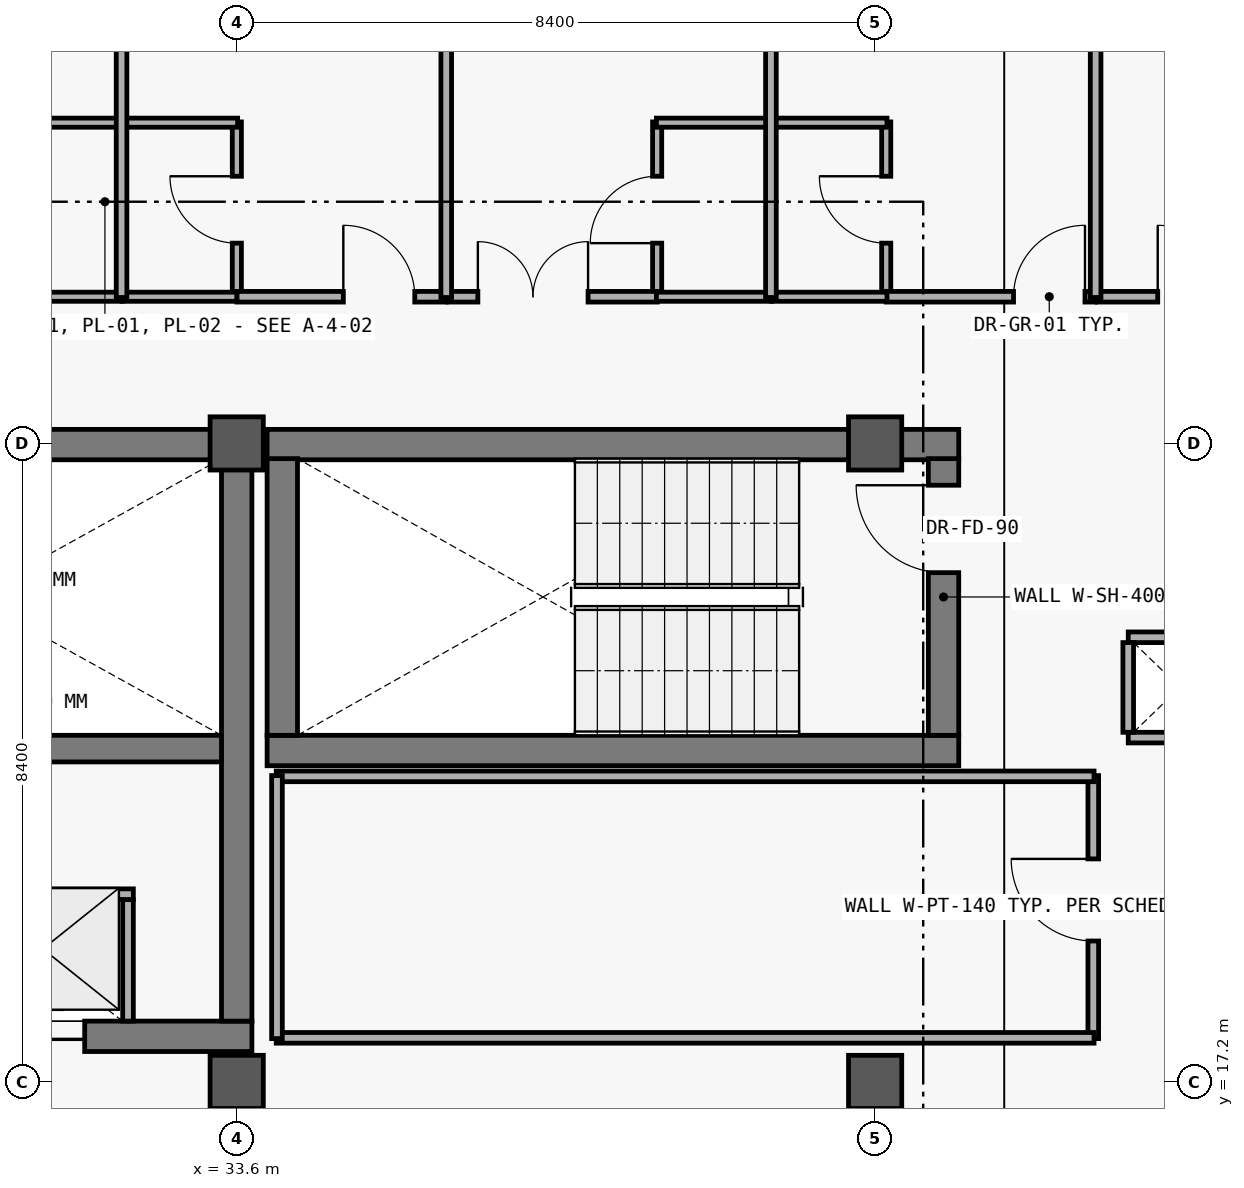
"""IFC4 building model, lengths in metres.
Left out: names, types, materials, properties, quantities, classifications, styles, units other than length and angle.
Written with IfcOpenShell. Run it as: python <this file> out.ifc"""

import sys

from ifc_helpers import new_model, si_unit, direction, frame, frame_2d, origin, origin_2d, place, context, subcontext, project, spatial, rectangle, extrude, element, fill, save


model = new_model("IFC4")
c1 = context("Model", 3, precision=1e-05, world=origin(), true_north=direction((0.0, 1.0)))
c2 = subcontext(c1, "Body", "Model", "MODEL_VIEW")
j1 = project(units=[si_unit("LENGTHUNIT", "METRE"), si_unit("PLANEANGLEUNIT", "RADIAN")], contexts=[c1])
p1 = place(None, origin())
s1 = spatial("IfcSite", under=j1, at=p1, CompositionType="ELEMENT")
p2 = place(p1, origin())
s2 = spatial("IfcBuilding", under=s1, at=p2, CompositionType="ELEMENT")
p3 = place(p2, frame((0.0, 0.0, 19.2)))
s3 = spatial("IfcBuildingStorey", under=s2, at=p3, CompositionType="ELEMENT", Elevation=19.2)
for number, where, z_axis, x_axis in (
    (1, (33.6, 17.2, 0.0), (0.0, 0.0, 1.0), (1.0, 0.0, 0.0)),
    (2, (33.6, 25.6, 0.0), (0.0, 0.0, 1.0), (1.0, 0.0, 0.0)),
    (3, (42.0, 17.2, 0.0), (0.0, 0.0, 1.0), (1.0, 0.0, 0.0)),
    (4, (42.0, 25.6, 0.0), (0.0, 0.0, 1.0), (1.0, 0.0, 0.0)),
):
    element("IfcColumn", number, at=place(p3, frame(where, z_axis=z_axis, x_axis=x_axis)), inside=s3, PredefinedType="COLUMN", context=c2, shape_type="SweptSolid", body=[
        extrude(rectangle(XDim=0.7, YDim=0.7, at=origin_2d()), origin(), (0.0, 0.0, 1.0), 3.6),
    ])
p4 = place(p3, frame((24.6, 17.8, 0.0), z_axis=(0.0, 0.0, 1.0), x_axis=(1.0, 0.0, 0.0)))
e5 = element("IfcWall", 5, at=p4, inside=s3, PredefinedType="SHEAR", context=c2, shape_type="SweptSolid", body=[
    extrude(rectangle(XDim=9.2, YDim=0.4, at=frame_2d((4.6, 0.0))), origin(), (0.0, 0.0, 1.0), 3.32),
])
p5 = place(p4, frame((1.1, 0.0, 0.0)))
e6 = element("IfcOpeningElement", 6, at=p5, cuts=e5, PredefinedType="OPENING", context=c2, shape_type="SweptSolid", body=[
    extrude(rectangle(XDim=1.2, YDim=2.2, at=frame_2d((0.6, 1.1))), frame((0.0, 0.21, 0.0), z_axis=(0.0, -1.0, 0.0), x_axis=(1.0, 0.0, 0.0)), (0.0, 0.0, 1.0), 0.42),
])
p6 = place(p4, frame((3.5, 0.0, 0.0)))
e7 = element("IfcOpeningElement", 7, at=p6, cuts=e5, PredefinedType="OPENING", context=c2, shape_type="SweptSolid", body=[
    extrude(rectangle(XDim=1.1, YDim=2.2, at=frame_2d((0.55, 1.1))), frame((0.0, 0.21, 0.0), z_axis=(0.0, -1.0, 0.0), x_axis=(1.0, 0.0, 0.0)), (0.0, 0.0, 1.0), 0.42),
])
p7 = place(p4, frame((5.9, 0.0, 0.0)))
e8 = element("IfcOpeningElement", 8, at=p7, cuts=e5, PredefinedType="OPENING", context=c2, shape_type="SweptSolid", body=[
    extrude(rectangle(XDim=1.1, YDim=2.2, at=frame_2d((0.55, 1.1))), frame((0.0, 0.21, 0.0), z_axis=(0.0, -1.0, 0.0), x_axis=(1.0, 0.0, 0.0)), (0.0, 0.0, 1.0), 0.42),
])
p8 = place(p3, frame((33.8, 25.585, 0.0), z_axis=(0.0, 0.0, 1.0), x_axis=(-1.0, 0.0, 0.0)))
e9 = element("IfcWall", 9, at=p8, inside=s3, PredefinedType="SHEAR", context=c2, shape_type="SweptSolid", body=[
    extrude(rectangle(XDim=9.2, YDim=0.4, at=frame_2d((4.6, 0.0))), origin(), (0.0, 0.0, 1.0), 3.32),
])
p9 = place(p3, frame((33.6, 18.0, 0.0), z_axis=(0.0, 0.0, 1.0), x_axis=(0.0, 1.0, 0.0)))
e10 = element("IfcWall", 10, at=p9, inside=s3, PredefinedType="SHEAR", context=c2, shape_type="SweptSolid", body=[
    extrude(rectangle(XDim=7.4, YDim=0.4, at=frame_2d((3.7, 0.0))), origin(), (0.0, 0.0, 1.0), 3.32),
])
p10 = place(p3, frame((25.0, 21.585, 0.0), z_axis=(0.0, 0.0, 1.0), x_axis=(1.0, 0.0, 0.0)))
e11 = element("IfcWall", 11, at=p10, inside=s3, PredefinedType="SHEAR", context=c2, shape_type="SweptSolid", body=[
    extrude(rectangle(XDim=8.4, YDim=0.35, at=frame_2d((4.2, 0.0))), origin(), (0.0, 0.0, 1.0), 3.32),
])
p11 = place(p3, frame((32.17, 18.0, 0.0), z_axis=(0.0, 0.0, 1.0), x_axis=(0.0, 1.0, 0.0)))
e12 = element("IfcWall", 12, at=p11, inside=s3, PredefinedType="PARTITIONING", context=c2, shape_type="SweptSolid", body=[
    extrude(rectangle(XDim=1.6, YDim=0.14, at=frame_2d((0.8, 0.0))), origin(), (0.0, 0.0, 1.0), 2.47),
])
p12 = place(p3, frame((25.06, 19.67, 0.0), z_axis=(0.0, 0.0, 1.0), x_axis=(1.0, 0.0, 0.0)))
e13 = element("IfcWall", 13, at=p12, inside=s3, PredefinedType="PARTITIONING", context=c2, shape_type="SweptSolid", body=[
    extrude(rectangle(XDim=7.18, YDim=0.14, at=frame_2d((3.59, 0.0))), origin(), (0.0, 0.0, 1.0), 2.47),
])
for number, where, z_axis, x_axis in (
    (14, (34.0, 21.56, 0.0), (0.0, 0.0, 1.0), (1.0, 0.0, 0.0)),
    (15, (43.1, 25.585, 0.0), (0.0, 0.0, 1.0), (-1.0, 0.0, 0.0)),
):
    element("IfcWall", number, at=place(p3, frame(where, z_axis=z_axis, x_axis=x_axis)), inside=s3, PredefinedType="SHEAR", context=c2, shape_type="SweptSolid", body=[
        extrude(rectangle(XDim=9.1, YDim=0.4, at=frame_2d((4.55, 0.0))), origin(), (0.0, 0.0, 1.0), 3.32),
    ])
p13 = place(p3, frame((34.2, 25.4, 0.0), z_axis=(0.0, 0.0, 1.0), x_axis=(0.0, -1.0, 0.0)))
e16 = element("IfcWall", 16, at=p13, inside=s3, PredefinedType="SHEAR", context=c2, shape_type="SweptSolid", body=[
    extrude(rectangle(XDim=3.64, YDim=0.4, at=frame_2d((1.82, 0.0))), origin(), (0.0, 0.0, 1.0), 3.32),
])
p14 = place(p3, frame((42.9, 21.76, 0.0), z_axis=(0.0, 0.0, 1.0), x_axis=(0.0, 1.0, 0.0)))
e17 = element("IfcWall", 17, at=p14, inside=s3, PredefinedType="SHEAR", context=c2, shape_type="SweptSolid", body=[
    extrude(rectangle(XDim=3.64, YDim=0.4, at=frame_2d((1.82, 0.0))), origin(), (0.0, 0.0, 1.0), 3.32),
])
p15 = place(p14, frame((2.14, 0.0, 0.0)))
e18 = element("IfcOpeningElement", 18, at=p15, cuts=e17, PredefinedType="OPENING", context=c2, shape_type="SweptSolid", body=[
    extrude(rectangle(XDim=1.15, YDim=2.2, at=frame_2d((0.575, 1.1))), frame((0.0, 0.21, 0.0), z_axis=(0.0, -1.0, 0.0), x_axis=(1.0, 0.0, 0.0)), (0.0, 0.0, 1.0), 0.42),
])
p16 = place(p3, frame((33.602, 27.52, 0.0), z_axis=(0.0, 0.0, 1.0), x_axis=(0.0, 1.0, 0.0)))
e19 = element("IfcWall", 19, at=p16, inside=s3, PredefinedType="PARTITIONING", context=c2, shape_type="SweptSolid", body=[
    extrude(rectangle(XDim=2.31, YDim=0.12, at=frame_2d((1.155, 0.0))), origin(), (0.0, 0.0, 1.0), 2.48),
])
p17 = place(p16, frame((0.715, 0.0, 0.0)))
e20 = element("IfcOpeningElement", 20, at=p17, cuts=e19, PredefinedType="OPENING", context=c2, shape_type="SweptSolid", body=[
    extrude(rectangle(XDim=0.88, YDim=2.15, at=frame_2d((0.44, 1.075))), frame((0.0, 0.07, 0.0), z_axis=(0.0, -1.0, 0.0), x_axis=(1.0, 0.0, 0.0)), (0.0, 0.0, 1.0), 0.14),
])
p18 = place(p3, frame((39.132, 27.52, 0.0), z_axis=(0.0, 0.0, 1.0), x_axis=(0.0, 1.0, 0.0)))
e21 = element("IfcWall", 21, at=p18, inside=s3, PredefinedType="PARTITIONING", context=c2, shape_type="SweptSolid", body=[
    extrude(rectangle(XDim=2.31, YDim=0.12, at=frame_2d((1.155, 0.0))), origin(), (0.0, 0.0, 1.0), 2.48),
])
p19 = place(p18, frame((0.715, 0.0, 0.0)))
e22 = element("IfcOpeningElement", 22, at=p19, cuts=e21, PredefinedType="OPENING", context=c2, shape_type="SweptSolid", body=[
    extrude(rectangle(XDim=0.88, YDim=2.15, at=frame_2d((0.44, 1.075))), frame((0.0, 0.07, 0.0), z_axis=(0.0, -1.0, 0.0), x_axis=(1.0, 0.0, 0.0)), (0.0, 0.0, 1.0), 0.14),
])
p20 = place(p3, frame((42.146, 27.52, 0.0), z_axis=(0.0, 0.0, 1.0), x_axis=(0.0, 1.0, 0.0)))
e23 = element("IfcWall", 23, at=p20, inside=s3, PredefinedType="PARTITIONING", context=c2, shape_type="SweptSolid", body=[
    extrude(rectangle(XDim=2.31, YDim=0.12, at=frame_2d((1.155, 0.0))), origin(), (0.0, 0.0, 1.0), 2.48),
])
p21 = place(p20, frame((0.715, 0.0, 0.0)))
e24 = element("IfcOpeningElement", 24, at=p21, cuts=e23, PredefinedType="OPENING", context=c2, shape_type="SweptSolid", body=[
    extrude(rectangle(XDim=0.88, YDim=2.15, at=frame_2d((0.44, 1.075))), frame((0.0, 0.07, 0.0), z_axis=(0.0, -1.0, 0.0), x_axis=(1.0, 0.0, 0.0)), (0.0, 0.0, 1.0), 0.14),
])
p22 = place(p3, frame((44.87, 17.77, 0.0), z_axis=(0.0, 0.0, 1.0), x_axis=(0.0, 1.0, 0.0)))
e25 = element("IfcWall", 25, at=p22, inside=s3, PredefinedType="PARTITIONING", context=c2, shape_type="SweptSolid", body=[
    extrude(rectangle(XDim=3.46, YDim=0.14, at=frame_2d((1.73, 0.0))), origin(), (0.0, 0.0, 1.0), 2.48),
])
p23 = place(p22, frame((1.284, 0.0, 0.0)))
e26 = element("IfcOpeningElement", 26, at=p23, cuts=e25, PredefinedType="OPENING", context=c2, shape_type="SweptSolid", body=[
    extrude(rectangle(XDim=1.08, YDim=2.25, at=frame_2d((0.54, 1.125))), frame((0.0, 0.08, 0.0), z_axis=(0.0, -1.0, 0.0), x_axis=(1.0, 0.0, 0.0)), (0.0, 0.0, 1.0), 0.16),
])
p24 = place(p3, frame((33.602, 27.53, 0.0), z_axis=(0.0, 0.0, 1.0), x_axis=(1.0, 0.0, 0.0)))
e27 = element("IfcWall", 27, at=p24, inside=s3, PredefinedType="PARTITIONING", context=c2, shape_type="SweptSolid", body=[
    extrude(rectangle(XDim=2.755, YDim=0.14, at=frame_2d((1.377, 0.0))), origin(), (0.0, 0.0, 1.0), 2.48),
])
p25 = place(p24, frame((1.401, 0.0, 0.0)))
e28 = element("IfcOpeningElement", 28, at=p25, cuts=e27, PredefinedType="OPENING", context=c2, shape_type="SweptSolid", body=[
    extrude(rectangle(XDim=0.94, YDim=2.2, at=frame_2d((0.47, 1.1))), frame((0.0, 0.08, 0.0), z_axis=(0.0, -1.0, 0.0), x_axis=(1.0, 0.0, 0.0)), (0.0, 0.0, 1.0), 0.16),
])
p26 = place(p3, frame((36.377, 27.53, 0.0), z_axis=(0.0, 0.0, 1.0), x_axis=(1.0, 0.0, 0.0)))
e29 = element("IfcWall", 29, at=p26, inside=s3, PredefinedType="PARTITIONING", context=c2, shape_type="SweptSolid", body=[
    extrude(rectangle(XDim=2.755, YDim=0.14, at=frame_2d((1.377, 0.0))), origin(), (0.0, 0.0, 1.0), 2.48),
])
p27 = place(p26, frame((0.396, 0.0, 0.0)))
e30 = element("IfcOpeningElement", 30, at=p27, cuts=e29, PredefinedType="OPENING", context=c2, shape_type="SweptSolid", body=[
    extrude(rectangle(XDim=1.45, YDim=2.3, at=frame_2d((0.725, 1.15))), frame((0.0, 0.08, 0.0), z_axis=(0.0, -1.0, 0.0), x_axis=(1.0, 0.0, 0.0)), (0.0, 0.0, 1.0), 0.16),
])
p28 = place(p3, frame((42.146, 27.53, 0.0), z_axis=(0.0, 0.0, 1.0), x_axis=(1.0, 0.0, 0.0)))
e31 = element("IfcWall", 31, at=p28, inside=s3, PredefinedType="PARTITIONING", context=c2, shape_type="SweptSolid", body=[
    extrude(rectangle(XDim=2.755, YDim=0.14, at=frame_2d((1.377, 0.0))), origin(), (0.0, 0.0, 1.0), 2.48),
])
p29 = place(p28, frame((1.675, 0.0, 0.0)))
e32 = element("IfcOpeningElement", 32, at=p29, cuts=e31, PredefinedType="OPENING", context=c2, shape_type="SweptSolid", body=[
    extrude(rectangle(XDim=0.94, YDim=2.2, at=frame_2d((0.47, 1.1))), frame((0.0, 0.08, 0.0), z_axis=(0.0, -1.0, 0.0), x_axis=(1.0, 0.0, 0.0)), (0.0, 0.0, 1.0), 0.16),
])
p30 = place(p3, frame((44.921, 27.53, 0.0), z_axis=(0.0, 0.0, 1.0), x_axis=(1.0, 0.0, 0.0)))
e33 = element("IfcWall", 33, at=p30, inside=s3, PredefinedType="PARTITIONING", context=c2, shape_type="SweptSolid", body=[
    extrude(rectangle(XDim=2.754, YDim=0.14, at=frame_2d((1.377, 0.0))), origin(), (0.0, 0.0, 1.0), 2.48),
])
p31 = place(p30, frame((0.797, 0.0, 0.0)))
e34 = element("IfcOpeningElement", 34, at=p31, cuts=e33, PredefinedType="OPENING", context=c2, shape_type="SweptSolid", body=[
    extrude(rectangle(XDim=0.94, YDim=2.2, at=frame_2d((0.47, 1.1))), frame((0.0, 0.08, 0.0), z_axis=(0.0, -1.0, 0.0), x_axis=(1.0, 0.0, 0.0)), (0.0, 0.0, 1.0), 0.16),
])
for number, where, z_axis, x_axis in (
    (35, (30.578, 27.53, 0.0), (0.0, 0.0, 1.0), (1.0, 0.0, 0.0)),
    (36, (30.578, 29.82, 0.0), (0.0, 0.0, 1.0), (1.0, 0.0, 0.0)),
):
    element("IfcWall", number, at=place(p3, frame(where, z_axis=z_axis, x_axis=x_axis)), inside=s3, PredefinedType="PARTITIONING", context=c2, shape_type="SweptSolid", body=[
        extrude(rectangle(XDim=1.517, YDim=0.12, at=frame_2d((0.759, 0.0))), origin(), (0.0, 0.0, 1.0), 2.48),
    ])
p32 = place(p3, frame((32.095, 27.53, 0.0), z_axis=(0.0, 0.0, 1.0), x_axis=(1.0, 0.0, 0.0)))
e37 = element("IfcWall", 37, at=p32, inside=s3, PredefinedType="PARTITIONING", context=c2, shape_type="SweptSolid", body=[
    extrude(rectangle(XDim=1.507, YDim=0.12, at=frame_2d((0.753, 0.0))), origin(), (0.0, 0.0, 1.0), 2.48),
])
p33 = place(p3, frame((32.095, 29.82, 0.0), z_axis=(0.0, 0.0, 1.0), x_axis=(1.0, 0.0, 0.0)))
e38 = element("IfcWall", 38, at=p33, inside=s3, PredefinedType="PARTITIONING", context=c2, shape_type="SweptSolid", body=[
    extrude(rectangle(XDim=1.517, YDim=0.12, at=frame_2d((0.759, 0.0))), origin(), (0.0, 0.0, 1.0), 2.48),
])
for number, where, z_axis, x_axis in (
    (39, (39.122, 27.53, 0.0), (0.0, 0.0, 1.0), (1.0, 0.0, 0.0)),
    (40, (39.122, 29.82, 0.0), (0.0, 0.0, 1.0), (1.0, 0.0, 0.0)),
):
    element("IfcWall", number, at=place(p3, frame(where, z_axis=z_axis, x_axis=x_axis)), inside=s3, PredefinedType="PARTITIONING", context=c2, shape_type="SweptSolid", body=[
        extrude(rectangle(XDim=1.517, YDim=0.12, at=frame_2d((0.758, 0.0))), origin(), (0.0, 0.0, 1.0), 2.48),
    ])
for number, where, z_axis, x_axis in (
    (41, (40.639, 27.53, 0.0), (0.0, 0.0, 1.0), (1.0, 0.0, 0.0)),
    (42, (40.639, 29.82, 0.0), (0.0, 0.0, 1.0), (1.0, 0.0, 0.0)),
):
    element("IfcWall", number, at=place(p3, frame(where, z_axis=z_axis, x_axis=x_axis)), inside=s3, PredefinedType="PARTITIONING", context=c2, shape_type="SweptSolid", body=[
        extrude(rectangle(XDim=1.517, YDim=0.12, at=frame_2d((0.759, 0.0))), origin(), (0.0, 0.0, 1.0), 2.48),
    ])
for number, where, z_axis, x_axis in (
    (43, (34.12, 17.78, 0.0), (0.0, 0.0, 1.0), (1.0, 0.0, 0.0)),
    (44, (34.12, 21.22, 0.0), (0.0, 0.0, 1.0), (1.0, 0.0, 0.0)),
):
    element("IfcWall", number, at=place(p3, frame(where, z_axis=z_axis, x_axis=x_axis)), inside=s3, PredefinedType="PARTITIONING", context=c2, shape_type="SweptSolid", body=[
        extrude(rectangle(XDim=10.76, YDim=0.14, at=frame_2d((5.38, 0.0))), origin(), (0.0, 0.0, 1.0), 2.48),
    ])
p34 = place(p3, frame((34.13, 17.77, 0.0), z_axis=(0.0, 0.0, 1.0), x_axis=(0.0, 1.0, 0.0)))
e45 = element("IfcWall", 45, at=p34, inside=s3, PredefinedType="PARTITIONING", context=c2, shape_type="SweptSolid", body=[
    extrude(rectangle(XDim=3.46, YDim=0.14, at=frame_2d((1.73, 0.0))), origin(), (0.0, 0.0, 1.0), 2.48),
])
for number, where, z_axis, x_axis in (
    (46, (32.085, 27.52, 0.0), (0.0, 0.0, 1.0), (0.0, 1.0, 0.0)),
    (47, (36.357, 27.52, 0.0), (0.0, 0.0, 1.0), (0.0, 1.0, 0.0)),
    (48, (40.629, 27.52, 0.0), (0.0, 0.0, 1.0), (0.0, 1.0, 0.0)),
    (49, (44.901, 27.52, 0.0), (0.0, 0.0, 1.0), (0.0, 1.0, 0.0)),
):
    element("IfcWall", number, at=place(p3, frame(where, z_axis=z_axis, x_axis=x_axis)), inside=s3, PredefinedType="PARTITIONING", context=c2, shape_type="SweptSolid", body=[
        extrude(rectangle(XDim=6.2, YDim=0.14, at=frame_2d((3.1, 0.0))), origin(), (0.0, 0.0, 1.0), 2.48),
    ])
for number, where, z_axis, x_axis in (
    (50, (45.33, 21.73, 0.0), (0.0, 0.0, 1.0), (1.0, 0.0, 0.0)),
    (51, (46.69, 23.05, 0.0), (0.0, 0.0, 1.0), (-1.0, 0.0, 0.0)),
):
    element("IfcWall", number, at=place(p3, frame(where, z_axis=z_axis, x_axis=x_axis)), inside=s3, PredefinedType="PARTITIONING", context=c2, shape_type="SweptSolid", body=[
        extrude(rectangle(XDim=1.36, YDim=0.14, at=frame_2d((0.68, 0.0))), origin(), (0.0, 0.0, 1.0), 2.44),
    ])
p35 = place(p3, frame((45.33, 22.98, 0.0), z_axis=(0.0, 0.0, 1.0), x_axis=(0.0, -1.0, 0.0)))
e52 = element("IfcWall", 52, at=p35, inside=s3, PredefinedType="PARTITIONING", context=c2, shape_type="SweptSolid", body=[
    extrude(rectangle(XDim=1.18, YDim=0.14, at=frame_2d((0.59, 0.0))), origin(), (0.0, 0.0, 1.0), 2.44),
])
p36 = place(p7, origin())
e53 = element("IfcDoor", 53, at=p36, inside=s3, OperationType="DOUBLE_DOOR_SLIDING", PredefinedType="DOOR", context=c2, shape_type="SweptSolid", body=[
    extrude(rectangle(XDim=1.1, YDim=2.2, at=frame_2d((0.55, 1.1))), frame((0.0, 0.025, 0.0), z_axis=(0.0, -1.0, 0.0), x_axis=(1.0, 0.0, 0.0)), (0.0, 0.0, 1.0), 0.05),
])
fill(e8, e53)
p37 = place(p15, origin())
e54 = element("IfcDoor", 54, at=p37, inside=s3, OperationType="SINGLE_SWING_RIGHT", PredefinedType="DOOR", context=c2, shape_type="SweptSolid", body=[
    extrude(rectangle(XDim=1.15, YDim=2.2, at=frame_2d((0.575, 1.1))), frame((0.0, 0.025, 0.0), z_axis=(0.0, -1.0, 0.0), x_axis=(1.0, 0.0, 0.0)), (0.0, 0.0, 1.0), 0.05),
])
fill(e18, e54)
p38 = place(p17, origin())
e55 = element("IfcDoor", 55, at=p38, inside=s3, OperationType="SINGLE_SWING_RIGHT", PredefinedType="DOOR", context=c2, shape_type="SweptSolid", body=[
    extrude(rectangle(XDim=0.88, YDim=2.15, at=frame_2d((0.44, 1.075))), frame((0.0, 0.025, 0.0), z_axis=(0.0, -1.0, 0.0), x_axis=(1.0, 0.0, 0.0)), (0.0, 0.0, 1.0), 0.05),
])
fill(e20, e55)
p39 = place(p19, origin())
e56 = element("IfcDoor", 56, at=p39, inside=s3, OperationType="SINGLE_SWING_LEFT", PredefinedType="DOOR", context=c2, shape_type="SweptSolid", body=[
    extrude(rectangle(XDim=0.88, YDim=2.15, at=frame_2d((0.44, 1.075))), frame((0.0, 0.025, 0.0), z_axis=(0.0, -1.0, 0.0), x_axis=(1.0, 0.0, 0.0)), (0.0, 0.0, 1.0), 0.05),
])
fill(e22, e56)
p40 = place(p21, origin())
e57 = element("IfcDoor", 57, at=p40, inside=s3, OperationType="SINGLE_SWING_RIGHT", PredefinedType="DOOR", context=c2, shape_type="SweptSolid", body=[
    extrude(rectangle(XDim=0.88, YDim=2.15, at=frame_2d((0.44, 1.075))), frame((0.0, 0.025, 0.0), z_axis=(0.0, -1.0, 0.0), x_axis=(1.0, 0.0, 0.0)), (0.0, 0.0, 1.0), 0.05),
])
fill(e24, e57)
p41 = place(p23, origin())
e58 = element("IfcDoor", 58, at=p41, inside=s3, OperationType="SINGLE_SWING_RIGHT", PredefinedType="DOOR", context=c2, shape_type="SweptSolid", body=[
    extrude(rectangle(XDim=1.08, YDim=2.25, at=frame_2d((0.54, 1.125))), frame((0.0, 0.025, 0.0), z_axis=(0.0, -1.0, 0.0), x_axis=(1.0, 0.0, 0.0)), (0.0, 0.0, 1.0), 0.05),
])
fill(e26, e58)
p42 = place(p25, origin())
e59 = element("IfcDoor", 59, at=p42, inside=s3, OperationType="SINGLE_SWING_LEFT", PredefinedType="DOOR", context=c2, shape_type="SweptSolid", body=[
    extrude(rectangle(XDim=0.94, YDim=2.2, at=frame_2d((0.47, 1.1))), frame((0.0, 0.025, 0.0), z_axis=(0.0, -1.0, 0.0), x_axis=(1.0, 0.0, 0.0)), (0.0, 0.0, 1.0), 0.05),
])
fill(e28, e59)
p43 = place(p27, origin())
e60 = element("IfcDoor", 60, at=p43, inside=s3, OperationType="DOUBLE_DOOR_SINGLE_SWING", PredefinedType="DOOR", context=c2, shape_type="SweptSolid", body=[
    extrude(rectangle(XDim=1.45, YDim=2.3, at=frame_2d((0.725, 1.15))), frame((0.0, 0.025, 0.0), z_axis=(0.0, -1.0, 0.0), x_axis=(1.0, 0.0, 0.0)), (0.0, 0.0, 1.0), 0.05),
])
fill(e30, e60)
p44 = place(p29, origin())
e61 = element("IfcDoor", 61, at=p44, inside=s3, OperationType="SINGLE_SWING_RIGHT", PredefinedType="DOOR", context=c2, shape_type="SweptSolid", body=[
    extrude(rectangle(XDim=0.94, YDim=2.2, at=frame_2d((0.47, 1.1))), frame((0.0, 0.025, 0.0), z_axis=(0.0, -1.0, 0.0), x_axis=(1.0, 0.0, 0.0)), (0.0, 0.0, 1.0), 0.05),
])
fill(e32, e61)
p45 = place(p31, origin())
e62 = element("IfcDoor", 62, at=p45, inside=s3, OperationType="SINGLE_SWING_LEFT", PredefinedType="DOOR", context=c2, shape_type="SweptSolid", body=[
    extrude(rectangle(XDim=0.94, YDim=2.2, at=frame_2d((0.47, 1.1))), frame((0.0, 0.025, 0.0), z_axis=(0.0, -1.0, 0.0), x_axis=(1.0, 0.0, 0.0)), (0.0, 0.0, 1.0), 0.05),
])
fill(e34, e62)
save(model, sys.argv[1])
